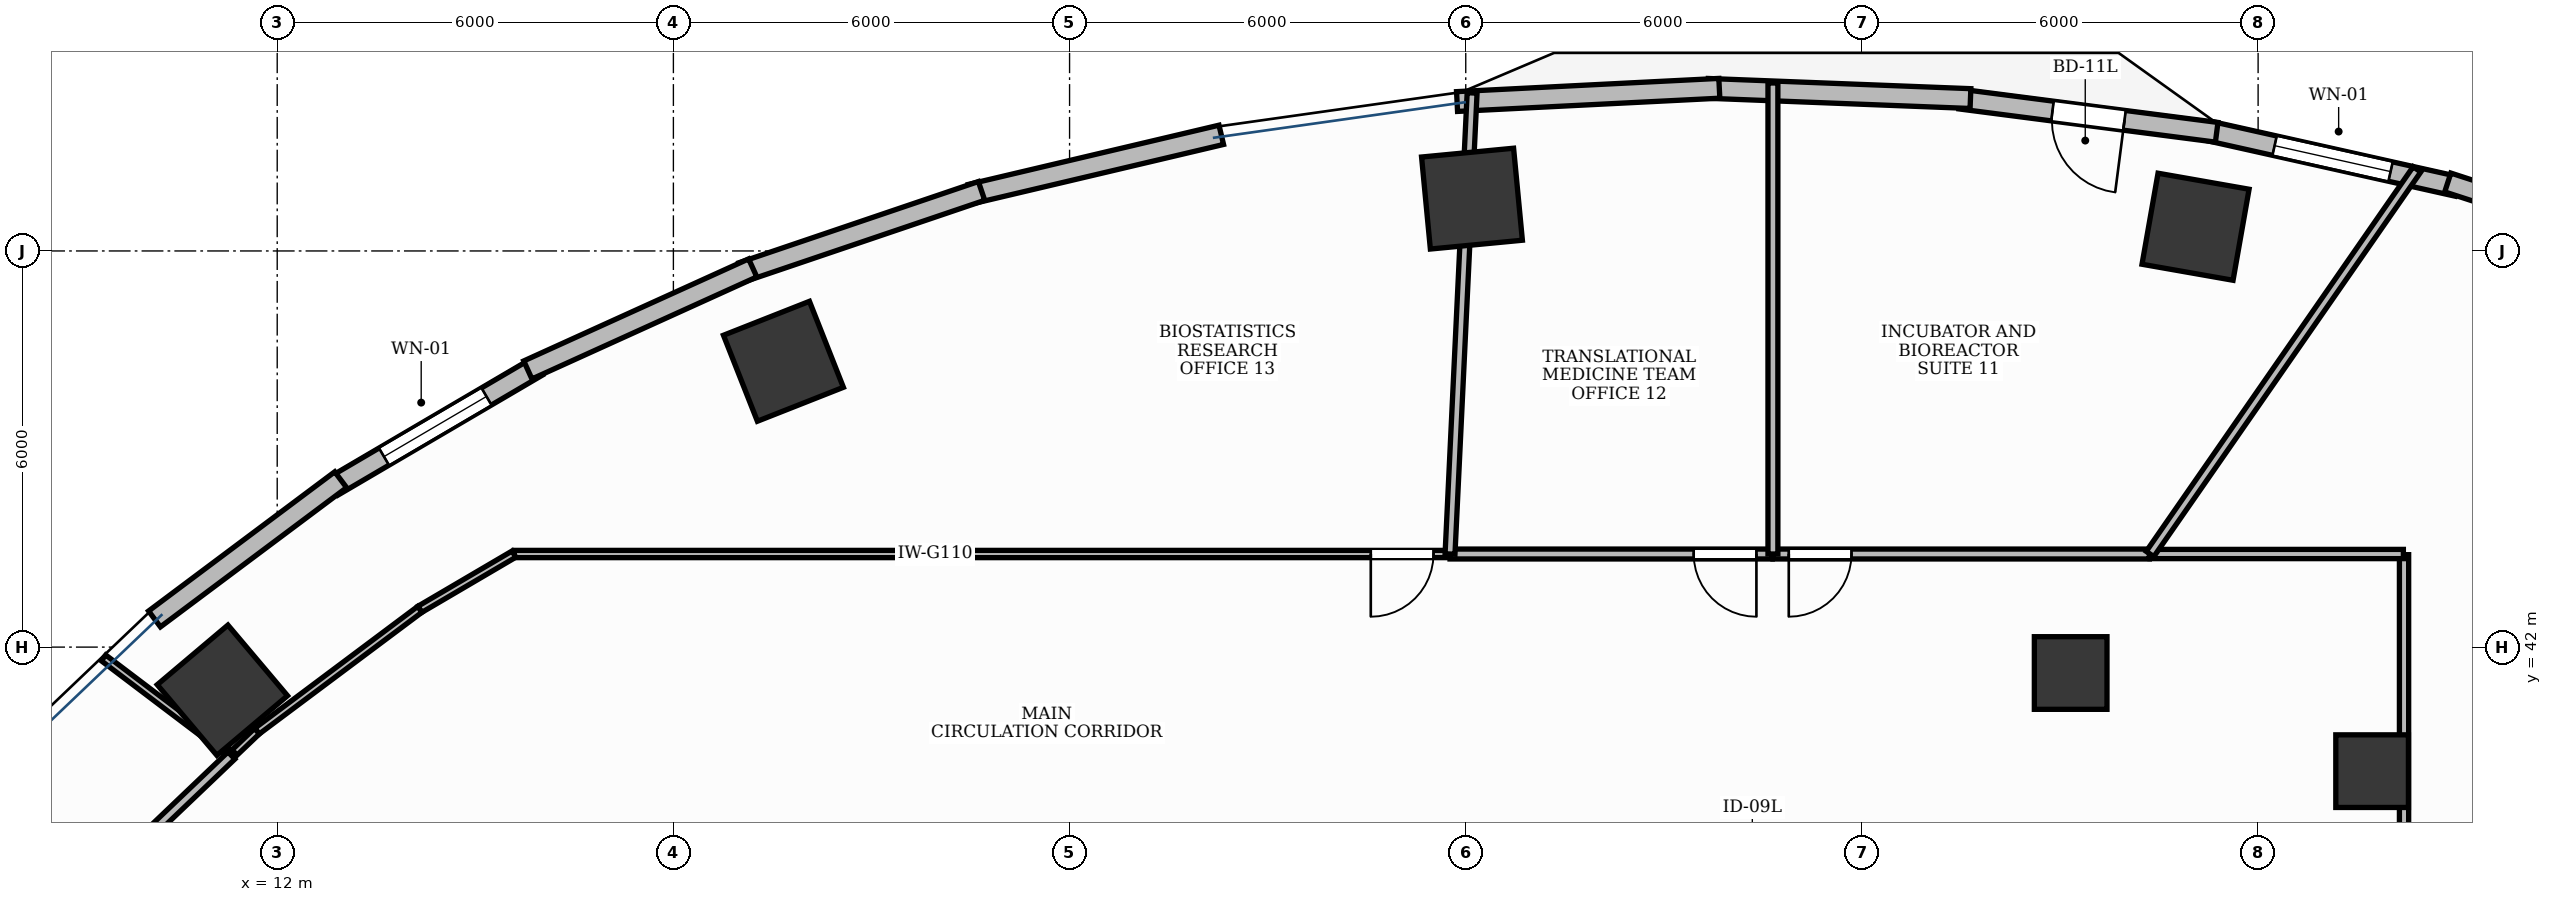
"""IFC4 building model, lengths in metres.
Left out: names, types, materials, properties, quantities, classifications, styles, units other than length and angle.
Written with IfcOpenShell. Run it as: python <this file> out.ifc"""

import sys

from ifc_helpers import new_model, si_unit, direction, frame, frame_2d, origin, origin_2d, place, context, subcontext, project, spatial, rectangle, extrude, element, fill, save


model = new_model("IFC4")
c1 = context("Model", 3, precision=1e-05, world=origin(), true_north=direction((0.0, 1.0)))
c2 = subcontext(c1, "Body", "Model", "MODEL_VIEW")
j1 = project(units=[si_unit("LENGTHUNIT", "METRE"), si_unit("PLANEANGLEUNIT", "RADIAN")], contexts=[c1])
p1 = place(None, origin())
s1 = spatial("IfcSite", under=j1, at=p1, CompositionType="ELEMENT")
p2 = place(p1, origin())
s2 = spatial("IfcBuilding", under=s1, at=p2, CompositionType="ELEMENT")
p3 = place(p2, frame((0.0, 0.0, 42.6)))
s3 = spatial("IfcBuildingStorey", under=s2, at=p3, CompositionType="ELEMENT", Elevation=42.6)
p4 = place(p3, frame((43.727, 40.121, -0.0), z_axis=(0.0, 0.0, 1.0), x_axis=(1.0, 0.0, 0.0)))
e1 = element("IfcColumn", 1, at=p4, inside=s3, PredefinedType="COLUMN", context=c2, shape_type="SweptSolid", body=[
    extrude(rectangle(XDim=1.1, YDim=1.1, at=origin_2d()), origin(), (0.0, 0.0, 1.0), 3.901),
])
p5 = place(p3, frame((41.052, 48.367, -0.0), z_axis=(0.0, 0.0, 1.0), x_axis=(-0.984868307662, 0.173304404339, 0.0)))
e2 = element("IfcColumn", 2, at=p5, inside=s3, PredefinedType="COLUMN", context=c2, shape_type="SweptSolid", body=[
    extrude(rectangle(XDim=1.4, YDim=1.4, at=origin_2d()), origin(), (0.0, 0.0, 1.0), 3.901),
])
p6 = place(p3, frame((39.161, 41.608, -0.0), z_axis=(0.0, 0.0, 1.0), x_axis=(1.0, 0.0, 0.0)))
e3 = element("IfcColumn", 3, at=p6, inside=s3, PredefinedType="COLUMN", context=c2, shape_type="SweptSolid", body=[
    extrude(rectangle(XDim=1.1, YDim=1.1, at=origin_2d()), origin(), (0.0, 0.0, 1.0), 3.901),
])
for number, where, z_axis, x_axis in (
    (4, (30.094, 48.792, -0.0), (0.0, 0.0, 1.0), (0.995, 0.095, 0.0)),
    (5, (19.667, 46.329, -0.0), (0.0, 0.0, 1.0), (0.93, 0.367, 0.0)),
    (6, (11.17, 41.347, -0.0), (0.0, 0.0, 1.0), (0.764, 0.645, 0.0)),
):
    element("IfcColumn", number, at=place(p3, frame(where, z_axis=z_axis, x_axis=x_axis)), inside=s3, PredefinedType="COLUMN", context=c2, shape_type="SweptSolid", body=[
        extrude(rectangle(XDim=1.4, YDim=1.4, at=origin_2d()), origin(), (0.0, 0.0, 1.0), 3.901),
    ])
p7 = place(p3, frame((45.016, 48.976, 0.0), z_axis=(0.0, 0.0, 1.0), x_axis=(-0.9758772609, 0.218319883791, 0.0)))
e7 = element("IfcWall", 7, at=p7, inside=s3, PredefinedType="STANDARD", context=c2, shape_type="SweptSolid", body=[
    extrude(rectangle(XDim=3.869, YDim=0.3, at=frame_2d((1.935, 0.0))), origin(), (0.0, 0.0, 1.0), 3.9),
])
p8 = place(p7, frame((1.034, 0.0, 0.9)))
e8 = element("IfcOpeningElement", 8, at=p8, cuts=e7, PredefinedType="OPENING", context=c2, shape_type="SweptSolid", body=[
    extrude(rectangle(XDim=1.8, YDim=2.1, at=frame_2d((0.9, 1.05))), frame((0.0, 0.165, 0.0), z_axis=(0.0, -1.0, 0.0), x_axis=(1.0, 0.0, 0.0)), (0.0, 0.0, 1.0), 0.33),
])
p9 = place(p3, frame((41.373, 49.798, 0.0), z_axis=(0.0, 0.0, 1.0), x_axis=(-0.991741322416, 0.128254237408, 0.0)))
e9 = element("IfcWall", 9, at=p9, inside=s3, PredefinedType="STANDARD", context=c2, shape_type="SweptSolid", body=[
    extrude(rectangle(XDim=3.916, YDim=0.3, at=frame_2d((1.958, 0.0))), origin(), (0.0, 0.0, 1.0), 3.47),
])
p10 = place(p9, frame((1.408, 0.0, 0.0)))
e10 = element("IfcOpeningElement", 10, at=p10, cuts=e9, PredefinedType="OPENING", context=c2, shape_type="SweptSolid", body=[
    extrude(rectangle(XDim=1.1, YDim=2.15, at=frame_2d((0.55, 1.075))), frame((0.0, 0.165, 0.0), z_axis=(0.0, -1.0, 0.0), x_axis=(1.0, 0.0, 0.0)), (0.0, 0.0, 1.0), 0.33),
])
p11 = place(p3, frame((15.944, 46.25, 0.0), z_axis=(0.0, 0.0, 1.0), x_axis=(-0.862473134325, -0.506102847817, 0.0)))
e11 = element("IfcWall", 11, at=p11, inside=s3, PredefinedType="STANDARD", context=c2, shape_type="SweptSolid", body=[
    extrude(rectangle(XDim=3.595, YDim=0.3, at=frame_2d((1.798, 0.0))), origin(), (0.0, 0.0, 1.0), 3.9),
])
p12 = place(p11, frame((0.898, 0.0, 0.9)))
e12 = element("IfcOpeningElement", 12, at=p12, cuts=e11, PredefinedType="OPENING", context=c2, shape_type="SweptSolid", body=[
    extrude(rectangle(XDim=1.8, YDim=2.1, at=frame_2d((0.9, 1.05))), frame((0.0, 0.165, 0.0), z_axis=(0.0, -1.0, 0.0), x_axis=(1.0, 0.0, 0.0)), (0.0, 0.0, 1.0), 0.33),
])
p13 = place(p3, frame((48.525, 47.849, 0.0), z_axis=(0.0, 0.0, 1.0), x_axis=(-0.950965833732, 0.309295947393, 0.0)))
e13 = element("IfcWall", 13, at=p13, inside=s3, PredefinedType="STANDARD", context=c2, shape_type="SweptSolid", body=[
    extrude(rectangle(XDim=3.84, YDim=0.3, at=frame_2d((1.92, 0.0))), origin(), (0.0, 0.0, 1.0), 3.9),
])
p14 = place(p3, frame((37.644, 50.308, 0.0), z_axis=(0.0, 0.0, 1.0), x_axis=(-0.999245411623, 0.038840794937, 0.0)))
e14 = element("IfcWall", 14, at=p14, inside=s3, PredefinedType="STANDARD", context=c2, shape_type="SweptSolid", body=[
    extrude(rectangle(XDim=3.979, YDim=0.3, at=frame_2d((1.989, 0.0))), origin(), (0.0, 0.0, 1.0), 3.9),
])
p15 = place(p3, frame((33.84, 50.463, 0.0), z_axis=(0.0, 0.0, 1.0), x_axis=(-0.998732359232, -0.050335619826, 0.0)))
e15 = element("IfcWall", 15, at=p15, inside=s3, PredefinedType="STANDARD", context=c2, shape_type="SweptSolid", body=[
    extrude(rectangle(XDim=3.977, YDim=0.3, at=frame_2d((1.989, 0.0))), origin(), (0.0, 0.0, 1.0), 3.47),
])
p16 = place(p3, frame((26.297, 49.759, 0.0), z_axis=(0.0, 0.0, 1.0), x_axis=(-0.973197600754, -0.229970497863, 0.0)))
e16 = element("IfcWall", 16, at=p16, inside=s3, PredefinedType="STANDARD", context=c2, shape_type="SweptSolid", body=[
    extrude(rectangle(XDim=3.901, YDim=0.3, at=frame_2d((1.951, 0.0))), origin(), (0.0, 0.0, 1.0), 3.9),
])
p17 = place(p3, frame((22.667, 48.909, 0.0), z_axis=(0.0, 0.0, 1.0), x_axis=(-0.94702579403, -0.321157508773, 0.0)))
e17 = element("IfcWall", 17, at=p17, inside=s3, PredefinedType="STANDARD", context=c2, shape_type="SweptSolid", body=[
    extrude(rectangle(XDim=3.83, YDim=0.3, at=frame_2d((1.915, 0.0))), origin(), (0.0, 0.0, 1.0), 3.9),
])
p18 = place(p3, frame((19.201, 47.743, 0.0), z_axis=(0.0, 0.0, 1.0), x_axis=(-0.910623406862, -0.413237233166, 0.0)))
e18 = element("IfcWall", 18, at=p18, inside=s3, PredefinedType="STANDARD", context=c2, shape_type="SweptSolid", body=[
    extrude(rectangle(XDim=3.74, YDim=0.3, at=frame_2d((1.87, 0.0))), origin(), (0.0, 0.0, 1.0), 3.9),
])
p19 = place(p3, frame((12.961, 44.535, 0.0), z_axis=(0.0, 0.0, 1.0), x_axis=(-0.800823020995, -0.598901067827, 0.0)))
e19 = element("IfcWall", 19, at=p19, inside=s3, PredefinedType="STANDARD", context=c2, shape_type="SweptSolid", body=[
    extrude(rectangle(XDim=3.521, YDim=0.3, at=frame_2d((1.76, 0.0))), origin(), (0.0, 0.0, 1.0), 3.9),
])
p20 = place(p3, frame((44.21, 29.72, 0.0), z_axis=(0.0, 0.0, 1.0), x_axis=(0.0, 1.0, 0.0)))
e20 = element("IfcWall", 20, at=p20, inside=s3, PredefinedType="PARTITIONING", context=c2, shape_type="SweptSolid", body=[
    extrude(rectangle(XDim=13.68, YDim=0.14, at=frame_2d((6.84, 0.0))), origin(), (0.0, 0.0, 1.0), 2.91),
])
p21 = place(p20, frame((2.202, 0.0, 0.0)))
e21 = element("IfcOpeningElement", 21, at=p21, cuts=e20, PredefinedType="OPENING", context=c2, shape_type="SweptSolid", body=[
    extrude(rectangle(XDim=0.95, YDim=2.15, at=frame_2d((0.475, 1.075))), frame((0.0, 0.085, 0.0), z_axis=(0.0, -1.0, 0.0), x_axis=(1.0, 0.0, 0.0)), (0.0, 0.0, 1.0), 0.17),
])
p22 = place(p3, frame((40.353, 43.41, 0.0), z_axis=(0.0, 0.0, 1.0), x_axis=(-1.0, 0.0, 0.0)))
e22 = element("IfcWall", 22, at=p22, inside=s3, PredefinedType="PARTITIONING", context=c2, shape_type="SweptSolid", body=[
    extrude(rectangle(XDim=5.701, YDim=0.15, at=frame_2d((2.851, 0.0))), origin(), (0.0, 0.0, 1.0), 2.91),
])
p23 = place(p22, frame((4.511, 0.0, 0.0)))
e23 = element("IfcOpeningElement", 23, at=p23, cuts=e22, PredefinedType="OPENING", context=c2, shape_type="SweptSolid", body=[
    extrude(rectangle(XDim=0.95, YDim=2.15, at=frame_2d((0.475, 1.075))), frame((0.0, 0.09, 0.0), z_axis=(0.0, -1.0, 0.0), x_axis=(1.0, 0.0, 0.0)), (0.0, 0.0, 1.0), 0.18),
])
p24 = place(p3, frame((34.642, 43.41, 0.0), z_axis=(0.0, 0.0, 1.0), x_axis=(-1.0, 0.0, 0.0)))
e24 = element("IfcWall", 24, at=p24, inside=s3, PredefinedType="PARTITIONING", context=c2, shape_type="SweptSolid", body=[
    extrude(rectangle(XDim=4.88, YDim=0.15, at=frame_2d((2.44, 0.0))), origin(), (0.0, 0.0, 1.0), 2.91),
])
p25 = place(p24, frame((0.24, 0.0, 0.0)))
e25 = element("IfcOpeningElement", 25, at=p25, cuts=e24, PredefinedType="OPENING", context=c2, shape_type="SweptSolid", body=[
    extrude(rectangle(XDim=0.95, YDim=2.15, at=frame_2d((0.475, 1.075))), frame((0.0, 0.09, 0.0), z_axis=(0.0, -1.0, 0.0), x_axis=(1.0, 0.0, 0.0)), (0.0, 0.0, 1.0), 0.18),
])
p26 = place(p3, frame((29.752, 43.41, 0.0), z_axis=(0.0, 0.0, 1.0), x_axis=(-1.0, 0.0, 0.0)))
e26 = element("IfcWall", 26, at=p26, inside=s3, PredefinedType="MOVABLE", context=c2, shape_type="SweptSolid", body=[
    extrude(rectangle(XDim=14.161, YDim=0.11, at=frame_2d((7.081, 0.0))), origin(), (0.0, 0.0, 1.0), 2.91),
])
p27 = place(p26, frame((0.24, 0.0, 0.0)))
e27 = element("IfcOpeningElement", 27, at=p27, cuts=e26, PredefinedType="OPENING", context=c2, shape_type="SweptSolid", body=[
    extrude(rectangle(XDim=0.95, YDim=2.15, at=frame_2d((0.475, 1.075))), frame((0.0, 0.07, 0.0), z_axis=(0.0, -1.0, 0.0), x_axis=(1.0, 0.0, 0.0)), (0.0, 0.0, 1.0), 0.14),
])
p28 = place(p3, frame((44.2, 43.41, 0.0), z_axis=(0.0, 0.0, 1.0), x_axis=(-1.0, 0.0, 0.0)))
e28 = element("IfcWall", 28, at=p28, inside=s3, PredefinedType="PARTITIONING", context=c2, shape_type="SweptSolid", body=[
    extrude(rectangle(XDim=3.837, YDim=0.14, at=frame_2d((1.918, 0.0))), origin(), (0.0, 0.0, 1.0), 2.91),
])
p29 = place(p3, frame((40.363, 43.41, 0.0), z_axis=(0.0, 0.0, 1.0), x_axis=(0.570097674314, 0.821576923813, 0.0)))
e29 = element("IfcWall", 29, at=p29, inside=s3, PredefinedType="PARTITIONING", context=c2, shape_type="SweptSolid", body=[
    extrude(rectangle(XDim=7.091, YDim=0.14, at=frame_2d((3.545, 0.0))), origin(), (0.0, 0.0, 1.0), 2.91),
])
p30 = place(p3, frame((34.652, 43.41, 0.0), z_axis=(0.0, 0.0, 1.0), x_axis=(0.0, 1.0, 0.0)))
e30 = element("IfcWall", 30, at=p30, inside=s3, PredefinedType="PARTITIONING", context=c2, shape_type="SweptSolid", body=[
    extrude(rectangle(XDim=7.134, YDim=0.15, at=frame_2d((3.567, 0.0))), origin(), (0.0, 0.0, 1.0), 2.91),
])
p31 = place(p3, frame((29.762, 43.41, 0.0), z_axis=(0.0, 0.0, 1.0), x_axis=(0.047838889666, 0.99885506488, 0.0)))
e31 = element("IfcWall", 31, at=p31, inside=s3, PredefinedType="PARTITIONING", context=c2, shape_type="SweptSolid", body=[
    extrude(rectangle(XDim=6.992, YDim=0.15, at=frame_2d((3.496, 0.0))), origin(), (0.0, 0.0, 1.0), 2.91),
])
p32 = place(p3, frame((15.586, 43.409, 0.0), z_axis=(0.0, 0.0, 1.0), x_axis=(-0.862446636904, -0.506148000582, 0.0)))
e32 = element("IfcWall", 32, at=p32, inside=s3, PredefinedType="MOVABLE", context=c2, shape_type="SweptSolid", body=[
    extrude(rectangle(XDim=1.652, YDim=0.11, at=frame_2d((0.826, 0.0))), origin(), (0.0, 0.0, 1.0), 2.91),
])
p33 = place(p3, frame((14.16, 42.572, 0.0), z_axis=(0.0, 0.0, 1.0), x_axis=(-0.800808090092, -0.598921032227, 0.0)))
e33 = element("IfcWall", 33, at=p33, inside=s3, PredefinedType="MOVABLE", context=c2, shape_type="SweptSolid", body=[
    extrude(rectangle(XDim=3.079, YDim=0.11, at=frame_2d((1.54, 0.0))), origin(), (0.0, 0.0, 1.0), 2.91),
])
p34 = place(p3, frame((11.693, 40.727, 0.0), z_axis=(0.0, 0.0, 1.0), x_axis=(-0.72367263626, -0.690143402148, 0.0)))
e34 = element("IfcWall", 34, at=p34, inside=s3, PredefinedType="MOVABLE", context=c2, shape_type="SweptSolid", body=[
    extrude(rectangle(XDim=0.524, YDim=0.11, at=frame_2d((0.262, 0.0))), origin(), (0.0, 0.0, 1.0), 2.91),
])
p35 = place(p3, frame((11.314, 40.365, 0.0), z_axis=(0.0, 0.0, 1.0), x_axis=(-0.797445450475, 0.603391045274, 0.0)))
e35 = element("IfcWall", 35, at=p35, inside=s3, PredefinedType="MOVABLE", context=c2, shape_type="SweptSolid", body=[
    extrude(rectangle(XDim=2.438, YDim=0.11, at=frame_2d((1.219, 0.0))), origin(), (0.0, 0.0, 1.0), 2.91),
])
p36 = place(p3, frame((11.307, 40.358, 0.0), z_axis=(0.0, 0.0, 1.0), x_axis=(-0.723655021688, -0.690161872017, 0.0)))
e36 = element("IfcWall", 36, at=p36, inside=s3, PredefinedType="PARTITIONING", context=c2, shape_type="SweptSolid", body=[
    extrude(rectangle(XDim=2.406, YDim=0.15, at=frame_2d((1.203, 0.0))), origin(), (0.0, 0.0, 1.0), 2.91),
])
p37 = place(p8, origin())
e37 = element("IfcWindow", 37, at=p37, inside=s3, PartitioningType="SINGLE_PANEL", PredefinedType="WINDOW", context=c2, shape_type="SweptSolid", body=[
    extrude(rectangle(XDim=1.8, YDim=2.1, at=frame_2d((0.9, 1.05))), frame((0.0, 0.03, 0.0), z_axis=(0.0, -1.0, 0.0), x_axis=(1.0, 0.0, 0.0)), (0.0, 0.0, 1.0), 0.06),
])
fill(e8, e37)
p38 = place(p10, origin())
e38 = element("IfcDoor", 38, at=p38, inside=s3, OperationType="SINGLE_SWING_LEFT", PredefinedType="DOOR", context=c2, shape_type="SweptSolid", body=[
    extrude(rectangle(XDim=1.1, YDim=2.15, at=frame_2d((0.55, 1.075))), frame((0.0, 0.025, 0.0), z_axis=(0.0, -1.0, 0.0), x_axis=(1.0, 0.0, 0.0)), (0.0, 0.0, 1.0), 0.05),
])
fill(e10, e38)
p39 = place(p12, origin())
e39 = element("IfcWindow", 39, at=p39, inside=s3, PartitioningType="SINGLE_PANEL", PredefinedType="WINDOW", context=c2, shape_type="SweptSolid", body=[
    extrude(rectangle(XDim=1.8, YDim=2.1, at=frame_2d((0.9, 1.05))), frame((0.0, 0.03, 0.0), z_axis=(0.0, -1.0, 0.0), x_axis=(1.0, 0.0, 0.0)), (0.0, 0.0, 1.0), 0.06),
])
fill(e12, e39)
p40 = place(p23, origin())
e40 = element("IfcDoor", 40, at=p40, inside=s3, OperationType="SINGLE_SWING_RIGHT", PredefinedType="DOOR", context=c2, shape_type="SweptSolid", body=[
    extrude(rectangle(XDim=0.95, YDim=2.15, at=frame_2d((0.475, 1.075))), frame((0.0, 0.025, 0.0), z_axis=(0.0, -1.0, 0.0), x_axis=(1.0, 0.0, 0.0)), (0.0, 0.0, 1.0), 0.05),
])
fill(e23, e40)
p41 = place(p25, origin())
e41 = element("IfcDoor", 41, at=p41, inside=s3, OperationType="SINGLE_SWING_LEFT", PredefinedType="DOOR", context=c2, shape_type="SweptSolid", body=[
    extrude(rectangle(XDim=0.95, YDim=2.15, at=frame_2d((0.475, 1.075))), frame((0.0, 0.025, 0.0), z_axis=(0.0, -1.0, 0.0), x_axis=(1.0, 0.0, 0.0)), (0.0, 0.0, 1.0), 0.05),
])
fill(e25, e41)
p42 = place(p27, origin())
e42 = element("IfcDoor", 42, at=p42, inside=s3, OperationType="SINGLE_SWING_RIGHT", PredefinedType="DOOR", context=c2, shape_type="SweptSolid", body=[
    extrude(rectangle(XDim=0.95, YDim=2.15, at=frame_2d((0.475, 1.075))), frame((0.0, 0.025, 0.0), z_axis=(0.0, -1.0, 0.0), x_axis=(1.0, 0.0, 0.0)), (0.0, 0.0, 1.0), 0.05),
])
fill(e27, e42)
save(model, sys.argv[1])
